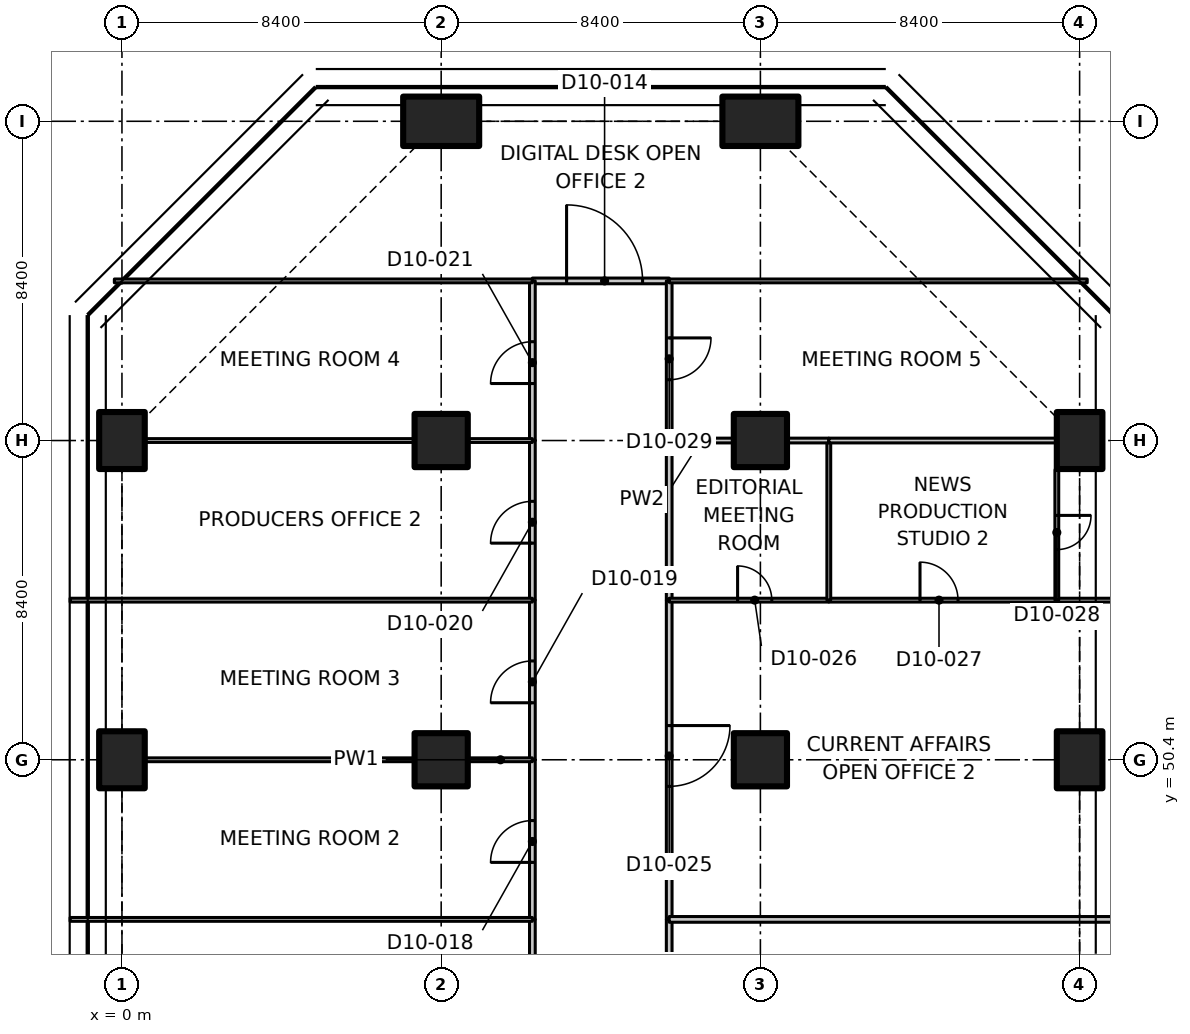
"""IFC4 building model, lengths in metres.
Left out: names, types, materials, properties, quantities, classifications, styles, units other than length and angle.
Written with IfcOpenShell. Run it as: python <this file> out.ifc"""

import sys

from ifc_helpers import new_model, si_unit, direction, frame, frame_2d, origin, origin_2d, place, context, subcontext, project, spatial, polyline, rectangle, outline, extrude, element, fill, save


model = new_model("IFC4")
c1 = context("Model", 3, precision=1e-05, world=origin(), true_north=direction((0.0, 1.0)))
c2 = subcontext(c1, "Body", "Model", "MODEL_VIEW")
j1 = project(units=[si_unit("LENGTHUNIT", "METRE"), si_unit("PLANEANGLEUNIT", "RADIAN")], contexts=[c1])
p1 = place(None, origin())
s1 = spatial("IfcSite", under=j1, at=p1, CompositionType="ELEMENT")
p2 = place(p1, origin())
s2 = spatial("IfcBuilding", under=s1, at=p2, CompositionType="ELEMENT")
p3 = place(p2, frame((0.0, 0.0, 68.9)))
s3 = spatial("IfcBuildingStorey", under=s2, at=p3, CompositionType="ELEMENT", Elevation=68.9)
for number, where, z_axis, x_axis in (
    (1, (0.0, 50.4, 0.0), (0.0, 0.0, 1.0), (1.0, 0.0, 0.0)),
    (2, (0.0, 58.8, 0.0), (0.0, 0.0, 1.0), (1.0, 0.0, 0.0)),
):
    element("IfcColumn", number, at=place(p3, frame(where, z_axis=z_axis, x_axis=x_axis)), inside=s3, PredefinedType="COLUMN", context=c2, shape_type="SweptSolid", body=[
        extrude(rectangle(XDim=1.2, YDim=1.5, at=origin_2d()), origin(), (0.0, 0.0, 1.0), 3.35),
    ])
for number, where, z_axis, x_axis in (
    (3, (8.4, 50.4, 0.0), (0.0, 0.0, 1.0), (1.0, 0.0, 0.0)),
    (4, (8.4, 58.8, 0.0), (0.0, 0.0, 1.0), (1.0, 0.0, 0.0)),
):
    element("IfcColumn", number, at=place(p3, frame(where, z_axis=z_axis, x_axis=x_axis)), inside=s3, PredefinedType="COLUMN", context=c2, shape_type="SweptSolid", body=[
        extrude(rectangle(XDim=1.4, YDim=1.4, at=origin_2d()), origin(), (0.0, 0.0, 1.0), 3.35),
    ])
p4 = place(p3, frame((8.4, 67.2, 0.0), z_axis=(0.0, 0.0, 1.0), x_axis=(0.0, 1.0, 0.0)))
e5 = element("IfcColumn", 5, at=p4, inside=s3, PredefinedType="COLUMN", context=c2, shape_type="SweptSolid", body=[
    extrude(rectangle(XDim=1.3, YDim=2.0, at=origin_2d()), origin(), (0.0, 0.0, 1.0), 3.35),
])
for number, where, z_axis, x_axis in (
    (6, (16.8, 50.4, 0.0), (0.0, 0.0, 1.0), (1.0, 0.0, 0.0)),
    (7, (16.8, 58.8, 0.0), (0.0, 0.0, 1.0), (1.0, 0.0, 0.0)),
):
    element("IfcColumn", number, at=place(p3, frame(where, z_axis=z_axis, x_axis=x_axis)), inside=s3, PredefinedType="COLUMN", context=c2, shape_type="SweptSolid", body=[
        extrude(rectangle(XDim=1.4, YDim=1.4, at=origin_2d()), origin(), (0.0, 0.0, 1.0), 3.35),
    ])
p5 = place(p3, frame((16.8, 67.2, 0.0), z_axis=(0.0, 0.0, 1.0), x_axis=(0.0, 1.0, 0.0)))
e8 = element("IfcColumn", 8, at=p5, inside=s3, PredefinedType="COLUMN", context=c2, shape_type="SweptSolid", body=[
    extrude(rectangle(XDim=1.3, YDim=2.0, at=origin_2d()), origin(), (0.0, 0.0, 1.0), 3.35),
])
for number, where, z_axis, x_axis in (
    (9, (25.2, 50.4, 0.0), (0.0, 0.0, 1.0), (1.0, 0.0, 0.0)),
    (10, (25.2, 58.8, 0.0), (0.0, 0.0, 1.0), (1.0, 0.0, 0.0)),
):
    element("IfcColumn", number, at=place(p3, frame(where, z_axis=z_axis, x_axis=x_axis)), inside=s3, PredefinedType="COLUMN", context=c2, shape_type="SweptSolid", body=[
        extrude(rectangle(XDim=1.2, YDim=1.5, at=origin_2d()), origin(), (0.0, 0.0, 1.0), 3.35),
    ])
p6 = place(p3, frame((10.8, 63.0, 0.0), z_axis=(0.0, 0.0, 1.0), x_axis=(1.0, 0.0, 0.0)))
e11 = element("IfcWall", 11, at=p6, inside=s3, PredefinedType="PARTITIONING", context=c2, shape_type="SweptSolid", body=[
    extrude(rectangle(XDim=3.6, YDim=0.15, at=frame_2d((1.8, 0.0))), origin(), (0.0, 0.0, 1.0), 3.33),
])
p7 = place(p6, frame((0.9, 0.0, 0.0)))
e12 = element("IfcOpeningElement", 12, at=p7, cuts=e11, PredefinedType="OPENING", context=c2, shape_type="SweptSolid", body=[
    extrude(rectangle(XDim=2.0, YDim=2.4, at=frame_2d((1.0, 1.2))), frame((0.0, 0.085, 0.0), z_axis=(0.0, -1.0, 0.0), x_axis=(1.0, 0.0, 0.0)), (0.0, 0.0, 1.0), 0.17),
])
p8 = place(p3, frame((10.8, 42.0, 0.0), z_axis=(0.0, 0.0, 1.0), x_axis=(0.0, 1.0, 0.0)))
e13 = element("IfcWall", 13, at=p8, inside=s3, PredefinedType="PARTITIONING", context=c2, shape_type="SweptSolid", body=[
    extrude(rectangle(XDim=4.2, YDim=0.15, at=frame_2d((2.1, 0.0))), origin(), (0.0, 0.0, 1.0), 3.33),
])
p9 = place(p8, frame((1.5, 0.0, 0.0)))
e14 = element("IfcOpeningElement", 14, at=p9, cuts=e13, PredefinedType="OPENING", context=c2, shape_type="SweptSolid", body=[
    extrude(rectangle(XDim=1.1, YDim=2.1, at=frame_2d((0.55, 1.05))), frame((0.0, 0.085, 0.0), z_axis=(0.0, -1.0, 0.0), x_axis=(1.0, 0.0, 0.0)), (0.0, 0.0, 1.0), 0.17),
])
p10 = place(p3, frame((10.8, 46.2, 0.0), z_axis=(0.0, 0.0, 1.0), x_axis=(0.0, 1.0, 0.0)))
e15 = element("IfcWall", 15, at=p10, inside=s3, PredefinedType="PARTITIONING", context=c2, shape_type="SweptSolid", body=[
    extrude(rectangle(XDim=4.2, YDim=0.15, at=frame_2d((2.1, 0.0))), origin(), (0.0, 0.0, 1.0), 3.33),
])
p11 = place(p10, frame((1.5, 0.0, 0.0)))
e16 = element("IfcOpeningElement", 16, at=p11, cuts=e15, PredefinedType="OPENING", context=c2, shape_type="SweptSolid", body=[
    extrude(rectangle(XDim=1.1, YDim=2.1, at=frame_2d((0.55, 1.05))), frame((0.0, 0.085, 0.0), z_axis=(0.0, -1.0, 0.0), x_axis=(1.0, 0.0, 0.0)), (0.0, 0.0, 1.0), 0.17),
])
p12 = place(p3, frame((10.8, 50.4, 0.0), z_axis=(0.0, 0.0, 1.0), x_axis=(0.0, 1.0, 0.0)))
e17 = element("IfcWall", 17, at=p12, inside=s3, PredefinedType="PARTITIONING", context=c2, shape_type="SweptSolid", body=[
    extrude(rectangle(XDim=4.2, YDim=0.15, at=frame_2d((2.1, 0.0))), origin(), (0.0, 0.0, 1.0), 3.33),
])
p13 = place(p12, frame((1.5, 0.0, 0.0)))
e18 = element("IfcOpeningElement", 18, at=p13, cuts=e17, PredefinedType="OPENING", context=c2, shape_type="SweptSolid", body=[
    extrude(rectangle(XDim=1.1, YDim=2.1, at=frame_2d((0.55, 1.05))), frame((0.0, 0.085, 0.0), z_axis=(0.0, -1.0, 0.0), x_axis=(1.0, 0.0, 0.0)), (0.0, 0.0, 1.0), 0.17),
])
p14 = place(p3, frame((10.8, 54.6, 0.0), z_axis=(0.0, 0.0, 1.0), x_axis=(0.0, 1.0, 0.0)))
e19 = element("IfcWall", 19, at=p14, inside=s3, PredefinedType="PARTITIONING", context=c2, shape_type="SweptSolid", body=[
    extrude(rectangle(XDim=4.2, YDim=0.15, at=frame_2d((2.1, 0.0))), origin(), (0.0, 0.0, 1.0), 3.33),
])
p15 = place(p14, frame((1.5, 0.0, 0.0)))
e20 = element("IfcOpeningElement", 20, at=p15, cuts=e19, PredefinedType="OPENING", context=c2, shape_type="SweptSolid", body=[
    extrude(rectangle(XDim=1.1, YDim=2.1, at=frame_2d((0.55, 1.05))), frame((0.0, 0.085, 0.0), z_axis=(0.0, -1.0, 0.0), x_axis=(1.0, 0.0, 0.0)), (0.0, 0.0, 1.0), 0.17),
])
p16 = place(p3, frame((10.8, 58.8, 0.0), z_axis=(0.0, 0.0, 1.0), x_axis=(0.0, 1.0, 0.0)))
e21 = element("IfcWall", 21, at=p16, inside=s3, PredefinedType="PARTITIONING", context=c2, shape_type="SweptSolid", body=[
    extrude(rectangle(XDim=4.2, YDim=0.15, at=frame_2d((2.1, 0.0))), origin(), (0.0, 0.0, 1.0), 3.33),
])
p17 = place(p16, frame((1.5, 0.0, 0.0)))
e22 = element("IfcOpeningElement", 22, at=p17, cuts=e21, PredefinedType="OPENING", context=c2, shape_type="SweptSolid", body=[
    extrude(rectangle(XDim=1.1, YDim=2.1, at=frame_2d((0.55, 1.05))), frame((0.0, 0.085, 0.0), z_axis=(0.0, -1.0, 0.0), x_axis=(1.0, 0.0, 0.0)), (0.0, 0.0, 1.0), 0.17),
])
p18 = place(p3, frame((14.4, 46.2, 0.0), z_axis=(0.0, 0.0, 1.0), x_axis=(0.0, -1.0, 0.0)))
e23 = element("IfcWall", 23, at=p18, inside=s3, PredefinedType="PARTITIONING", context=c2, shape_type="SweptSolid", body=[
    extrude(rectangle(XDim=8.4, YDim=0.15, at=frame_2d((4.2, 0.0))), origin(), (0.0, 0.0, 1.0), 3.33),
])
p19 = place(p18, frame((3.3, 0.0, 0.0)))
e24 = element("IfcOpeningElement", 24, at=p19, cuts=e23, PredefinedType="OPENING", context=c2, shape_type="SweptSolid", body=[
    extrude(rectangle(XDim=1.6, YDim=2.1, at=frame_2d((0.8, 1.05))), frame((0.0, 0.085, 0.0), z_axis=(0.0, -1.0, 0.0), x_axis=(1.0, 0.0, 0.0)), (0.0, 0.0, 1.0), 0.17),
])
p20 = place(p3, frame((14.4, 54.6, 0.0), z_axis=(0.0, 0.0, 1.0), x_axis=(0.0, -1.0, 0.0)))
e25 = element("IfcWall", 25, at=p20, inside=s3, PredefinedType="PARTITIONING", context=c2, shape_type="SweptSolid", body=[
    extrude(rectangle(XDim=8.4, YDim=0.15, at=frame_2d((4.2, 0.0))), origin(), (0.0, 0.0, 1.0), 3.33),
])
p21 = place(p20, frame((3.3, 0.0, 0.0)))
e26 = element("IfcOpeningElement", 26, at=p21, cuts=e25, PredefinedType="OPENING", context=c2, shape_type="SweptSolid", body=[
    extrude(rectangle(XDim=1.6, YDim=2.1, at=frame_2d((0.8, 1.05))), frame((0.0, 0.085, 0.0), z_axis=(0.0, -1.0, 0.0), x_axis=(1.0, 0.0, 0.0)), (0.0, 0.0, 1.0), 0.17),
])
p22 = place(p3, frame((14.4, 58.8, 0.0), z_axis=(0.0, 0.0, 1.0), x_axis=(0.0, -1.0, 0.0)))
e27 = element("IfcWall", 27, at=p22, inside=s3, PredefinedType="PARTITIONING", context=c2, shape_type="SweptSolid", body=[
    extrude(rectangle(XDim=4.2, YDim=0.15, at=frame_2d((2.1, 0.0))), origin(), (0.0, 0.0, 1.0), 3.33),
])
p23 = place(p3, frame((14.4, 63.0, 0.0), z_axis=(0.0, 0.0, 1.0), x_axis=(0.0, -1.0, 0.0)))
e28 = element("IfcWall", 28, at=p23, inside=s3, PredefinedType="PARTITIONING", context=c2, shape_type="SweptSolid", body=[
    extrude(rectangle(XDim=4.2, YDim=0.15, at=frame_2d((2.1, 0.0))), origin(), (0.0, 0.0, 1.0), 3.33),
])
p24 = place(p23, frame((1.5, 0.0, 0.0)))
e29 = element("IfcOpeningElement", 29, at=p24, cuts=e28, PredefinedType="OPENING", context=c2, shape_type="SweptSolid", body=[
    extrude(rectangle(XDim=1.1, YDim=2.1, at=frame_2d((0.55, 1.05))), frame((0.0, 0.085, 0.0), z_axis=(0.0, -1.0, 0.0), x_axis=(1.0, 0.0, 0.0)), (0.0, 0.0, 1.0), 0.17),
])
p25 = place(p3, frame((10.8, 63.0, 0.0), z_axis=(0.0, 0.0, 1.0), x_axis=(-1.0, 0.0, 0.0)))
e30 = element("IfcWall", 30, at=p25, inside=s3, PredefinedType="PARTITIONING", context=c2, shape_type="SweptSolid", body=[
    extrude(outline(polyline([(0.0, 0.0), (11.0, 0.0), (11.0, 3.33), (7.266, 3.33), (7.264, 2.98), (5.936, 2.98), (5.934, 3.33), (0.0, 3.33), (0.0, 0.0)])), frame((0.0, 0.05, 0.0), z_axis=(0.0, -1.0, 0.0), x_axis=(1.0, 0.0, 0.0)), (0.0, 0.0, 1.0), 0.1),
])
p26 = place(p3, frame((25.4, 63.0, 0.0), z_axis=(0.0, 0.0, 1.0), x_axis=(-1.0, 0.0, 0.0)))
e31 = element("IfcWall", 31, at=p26, inside=s3, PredefinedType="PARTITIONING", context=c2, shape_type="SweptSolid", body=[
    extrude(outline(polyline([(0.0, 0.0), (11.0, 0.0), (11.0, 3.33), (5.066, 3.33), (5.064, 2.98), (3.736, 2.98), (3.734, 3.33), (0.0, 3.33), (0.0, 0.0)])), frame((0.0, 0.05, 0.0), z_axis=(0.0, -1.0, 0.0), x_axis=(1.0, 0.0, 0.0)), (0.0, 0.0, 1.0), 0.1),
])
p27 = place(p3, frame((-1.365, 46.2, 0.0), z_axis=(0.0, 0.0, 1.0), x_axis=(1.0, 0.0, 0.0)))
e32 = element("IfcWall", 32, at=p27, inside=s3, PredefinedType="PARTITIONING", context=c2, shape_type="SweptSolid", body=[
    extrude(outline(polyline([(0.0, 0.0), (12.165, 0.0), (12.165, 3.33), (1.815, 3.33), (1.813, 2.98), (0.917, 2.98), (0.915, 3.33), (0.265, 3.33), (0.0, 3.33), (0.0, 0.0)])), frame((0.0, 0.05, 0.0), z_axis=(0.0, -1.0, 0.0), x_axis=(1.0, 0.0, 0.0)), (0.0, 0.0, 1.0), 0.1),
])
p28 = place(p3, frame((0.62, 50.4, 0.0), z_axis=(0.0, 0.0, 1.0), x_axis=(1.0, 0.0, 0.0)))
e33 = element("IfcWall", 33, at=p28, inside=s3, PredefinedType="PARTITIONING", context=c2, shape_type="SweptSolid", body=[
    extrude(rectangle(XDim=7.06, YDim=0.1, at=frame_2d((3.53, 0.0))), origin(), (0.0, 0.0, 1.0), 3.33),
])
p29 = place(p3, frame((9.12, 50.4, 0.0), z_axis=(0.0, 0.0, 1.0), x_axis=(1.0, 0.0, 0.0)))
e34 = element("IfcWall", 34, at=p29, inside=s3, PredefinedType="PARTITIONING", context=c2, shape_type="SweptSolid", body=[
    extrude(rectangle(XDim=1.68, YDim=0.1, at=frame_2d((0.84, 0.0))), origin(), (0.0, 0.0, 1.0), 3.33),
])
p30 = place(p3, frame((-1.365, 54.6, 0.0), z_axis=(0.0, 0.0, 1.0), x_axis=(1.0, 0.0, 0.0)))
e35 = element("IfcWall", 35, at=p30, inside=s3, PredefinedType="PARTITIONING", context=c2, shape_type="SweptSolid", body=[
    extrude(outline(polyline([(0.0, 0.0), (12.165, 0.0), (12.165, 3.33), (1.815, 3.33), (1.813, 2.98), (0.917, 2.98), (0.915, 3.33), (0.265, 3.33), (0.0, 3.33), (0.0, 0.0)])), frame((0.0, 0.05, 0.0), z_axis=(0.0, -1.0, 0.0), x_axis=(1.0, 0.0, 0.0)), (0.0, 0.0, 1.0), 0.1),
])
p31 = place(p3, frame((0.62, 58.8, 0.0), z_axis=(0.0, 0.0, 1.0), x_axis=(1.0, 0.0, 0.0)))
e36 = element("IfcWall", 36, at=p31, inside=s3, PredefinedType="PARTITIONING", context=c2, shape_type="SweptSolid", body=[
    extrude(rectangle(XDim=7.06, YDim=0.1, at=frame_2d((3.53, 0.0))), origin(), (0.0, 0.0, 1.0), 3.33),
])
p32 = place(p3, frame((9.12, 58.8, 0.0), z_axis=(0.0, 0.0, 1.0), x_axis=(1.0, 0.0, 0.0)))
e37 = element("IfcWall", 37, at=p32, inside=s3, PredefinedType="PARTITIONING", context=c2, shape_type="SweptSolid", body=[
    extrude(rectangle(XDim=1.68, YDim=0.1, at=frame_2d((0.84, 0.0))), origin(), (0.0, 0.0, 1.0), 3.33),
])
p33 = place(p3, frame((14.4, 46.2, 0.0), z_axis=(0.0, 0.0, 1.0), x_axis=(1.0, 0.0, 0.0)))
e38 = element("IfcWall", 38, at=p33, inside=s3, PredefinedType="PARTITIONING", context=c2, shape_type="SweptSolid", body=[
    extrude(outline(polyline([(0.0, 0.0), (12.165, 0.0), (12.165, 3.33), (11.9, 3.33), (11.25, 3.33), (11.248, 2.98), (10.352, 2.98), (10.35, 3.33), (0.0, 3.33), (0.0, 0.0)])), frame((0.0, 0.075, 0.0), z_axis=(0.0, -1.0, 0.0), x_axis=(1.0, 0.0, 0.0)), (0.0, 0.0, 1.0), 0.15),
])
p34 = place(p3, frame((14.4, 54.6, 0.0), z_axis=(0.0, 0.0, 1.0), x_axis=(1.0, 0.0, 0.0)))
e39 = element("IfcWall", 39, at=p34, inside=s3, PredefinedType="PARTITIONING", context=c2, shape_type="SweptSolid", body=[
    extrude(rectangle(XDim=4.2, YDim=0.1, at=frame_2d((2.1, 0.0))), origin(), (0.0, 0.0, 1.0), 3.33),
])
p35 = place(p34, frame((1.8, 0.0, 0.0)))
e40 = element("IfcOpeningElement", 40, at=p35, cuts=e39, PredefinedType="OPENING", context=c2, shape_type="SweptSolid", body=[
    extrude(rectangle(XDim=0.9, YDim=2.1, at=frame_2d((0.45, 1.05))), frame((0.0, 0.06, 0.0), z_axis=(0.0, -1.0, 0.0), x_axis=(1.0, 0.0, 0.0)), (0.0, 0.0, 1.0), 0.12),
])
p36 = place(p3, frame((18.6, 54.6, 0.0), z_axis=(0.0, 0.0, 1.0), x_axis=(1.0, 0.0, 0.0)))
e41 = element("IfcWall", 41, at=p36, inside=s3, PredefinedType="PARTITIONING", context=c2, shape_type="SweptSolid", body=[
    extrude(rectangle(XDim=6.0, YDim=0.1, at=frame_2d((3.0, 0.0))), origin(), (0.0, 0.0, 1.0), 3.33),
])
p37 = place(p36, frame((2.4, 0.0, 0.0)))
e42 = element("IfcOpeningElement", 42, at=p37, cuts=e41, PredefinedType="OPENING", context=c2, shape_type="SweptSolid", body=[
    extrude(rectangle(XDim=1.0, YDim=2.1, at=frame_2d((0.5, 1.05))), frame((0.0, 0.06, 0.0), z_axis=(0.0, -1.0, 0.0), x_axis=(1.0, 0.0, 0.0)), (0.0, 0.0, 1.0), 0.12),
])
p38 = place(p3, frame((24.6, 54.6, 0.0), z_axis=(0.0, 0.0, 1.0), x_axis=(1.0, 0.0, 0.0)))
e43 = element("IfcWall", 43, at=p38, inside=s3, PredefinedType="PARTITIONING", context=c2, shape_type="SweptSolid", body=[
    extrude(rectangle(XDim=1.965, YDim=0.1, at=frame_2d((0.982, 0.0))), origin(), (0.0, 0.0, 1.0), 2.98),
])
p39 = place(p3, frame((18.6, 58.8, 0.0), z_axis=(0.0, 0.0, 1.0), x_axis=(0.0, -1.0, 0.0)))
e44 = element("IfcWall", 44, at=p39, inside=s3, PredefinedType="PARTITIONING", context=c2, shape_type="SweptSolid", body=[
    extrude(rectangle(XDim=4.2, YDim=0.1, at=frame_2d((2.1, 0.0))), origin(), (0.0, 0.0, 1.0), 3.33),
])
p40 = place(p3, frame((14.4, 58.8, 0.0), z_axis=(0.0, 0.0, 1.0), x_axis=(1.0, 0.0, 0.0)))
e45 = element("IfcWall", 45, at=p40, inside=s3, PredefinedType="PARTITIONING", context=c2, shape_type="SweptSolid", body=[
    extrude(rectangle(XDim=1.68, YDim=0.125, at=frame_2d((0.84, 0.0))), origin(), (0.0, 0.0, 1.0), 3.33),
])
p41 = place(p3, frame((17.52, 58.8, 0.0), z_axis=(0.0, 0.0, 1.0), x_axis=(1.0, 0.0, 0.0)))
e46 = element("IfcWall", 46, at=p41, inside=s3, PredefinedType="PARTITIONING", context=c2, shape_type="SweptSolid", body=[
    extrude(rectangle(XDim=1.08, YDim=0.125, at=frame_2d((0.54, 0.0))), origin(), (0.0, 0.0, 1.0), 3.33),
])
p42 = place(p3, frame((24.6, 58.03, 0.0), z_axis=(0.0, 0.0, 1.0), x_axis=(0.0, -1.0, 0.0)))
e47 = element("IfcWall", 47, at=p42, inside=s3, PredefinedType="PARTITIONING", context=c2, shape_type="SweptSolid", body=[
    extrude(rectangle(XDim=3.43, YDim=0.1, at=frame_2d((1.715, 0.0))), origin(), (0.0, 0.0, 1.0), 3.33),
])
p43 = place(p42, frame((1.2, 0.0, 0.0)))
e48 = element("IfcOpeningElement", 48, at=p43, cuts=e47, PredefinedType="OPENING", context=c2, shape_type="SweptSolid", body=[
    extrude(rectangle(XDim=0.9, YDim=2.1, at=frame_2d((0.45, 1.05))), frame((0.0, 0.06, 0.0), z_axis=(0.0, -1.0, 0.0), x_axis=(1.0, 0.0, 0.0)), (0.0, 0.0, 1.0), 0.12),
])
p44 = place(p3, frame((18.6, 58.8, 0.0), z_axis=(0.0, 0.0, 1.0), x_axis=(1.0, 0.0, 0.0)))
e49 = element("IfcWall", 49, at=p44, inside=s3, PredefinedType="PARTITIONING", context=c2, shape_type="SweptSolid", body=[
    extrude(rectangle(XDim=5.98, YDim=0.125, at=frame_2d((2.99, 0.0))), origin(), (0.0, 0.0, 1.0), 3.33),
])
p45 = place(p7, origin())
e50 = element("IfcDoor", 50, at=p45, inside=s3, OperationType="DOUBLE_DOOR_SINGLE_SWING", PredefinedType="DOOR", context=c2, shape_type="SweptSolid", body=[
    extrude(rectangle(XDim=2.0, YDim=2.4, at=frame_2d((1.0, 1.2))), frame((0.0, 0.025, 0.0), z_axis=(0.0, -1.0, 0.0), x_axis=(1.0, 0.0, 0.0)), (0.0, 0.0, 1.0), 0.05),
])
fill(e12, e50)
p46 = place(p11, origin())
e51 = element("IfcDoor", 51, at=p46, inside=s3, OperationType="SINGLE_SWING_LEFT", PredefinedType="DOOR", context=c2, shape_type="SweptSolid", body=[
    extrude(rectangle(XDim=1.1, YDim=2.1, at=frame_2d((0.55, 1.05))), frame((0.0, 0.025, 0.0), z_axis=(0.0, -1.0, 0.0), x_axis=(1.0, 0.0, 0.0)), (0.0, 0.0, 1.0), 0.05),
])
fill(e16, e51)
p47 = place(p13, origin())
e52 = element("IfcDoor", 52, at=p47, inside=s3, OperationType="SINGLE_SWING_LEFT", PredefinedType="DOOR", context=c2, shape_type="SweptSolid", body=[
    extrude(rectangle(XDim=1.1, YDim=2.1, at=frame_2d((0.55, 1.05))), frame((0.0, 0.025, 0.0), z_axis=(0.0, -1.0, 0.0), x_axis=(1.0, 0.0, 0.0)), (0.0, 0.0, 1.0), 0.05),
])
fill(e18, e52)
p48 = place(p15, origin())
e53 = element("IfcDoor", 53, at=p48, inside=s3, OperationType="SINGLE_SWING_LEFT", PredefinedType="DOOR", context=c2, shape_type="SweptSolid", body=[
    extrude(rectangle(XDim=1.1, YDim=2.1, at=frame_2d((0.55, 1.05))), frame((0.0, 0.025, 0.0), z_axis=(0.0, -1.0, 0.0), x_axis=(1.0, 0.0, 0.0)), (0.0, 0.0, 1.0), 0.05),
])
fill(e20, e53)
p49 = place(p17, origin())
e54 = element("IfcDoor", 54, at=p49, inside=s3, OperationType="SINGLE_SWING_LEFT", PredefinedType="DOOR", context=c2, shape_type="SweptSolid", body=[
    extrude(rectangle(XDim=1.1, YDim=2.1, at=frame_2d((0.55, 1.05))), frame((0.0, 0.025, 0.0), z_axis=(0.0, -1.0, 0.0), x_axis=(1.0, 0.0, 0.0)), (0.0, 0.0, 1.0), 0.05),
])
fill(e22, e54)
p50 = place(p21, origin())
e55 = element("IfcDoor", 55, at=p50, inside=s3, OperationType="DOUBLE_DOOR_SINGLE_SWING", PredefinedType="DOOR", context=c2, shape_type="SweptSolid", body=[
    extrude(rectangle(XDim=1.6, YDim=2.1, at=frame_2d((0.8, 1.05))), frame((0.0, 0.025, 0.0), z_axis=(0.0, -1.0, 0.0), x_axis=(1.0, 0.0, 0.0)), (0.0, 0.0, 1.0), 0.05),
])
fill(e26, e55)
p51 = place(p35, origin())
e56 = element("IfcDoor", 56, at=p51, inside=s3, OperationType="SINGLE_SWING_LEFT", PredefinedType="DOOR", context=c2, shape_type="SweptSolid", body=[
    extrude(rectangle(XDim=0.9, YDim=2.1, at=frame_2d((0.45, 1.05))), frame((0.0, 0.025, 0.0), z_axis=(0.0, -1.0, 0.0), x_axis=(1.0, 0.0, 0.0)), (0.0, 0.0, 1.0), 0.05),
])
fill(e40, e56)
p52 = place(p37, origin())
e57 = element("IfcDoor", 57, at=p52, inside=s3, OperationType="SINGLE_SWING_LEFT", PredefinedType="DOOR", context=c2, shape_type="SweptSolid", body=[
    extrude(rectangle(XDim=1.0, YDim=2.1, at=frame_2d((0.5, 1.05))), frame((0.0, 0.025, 0.0), z_axis=(0.0, -1.0, 0.0), x_axis=(1.0, 0.0, 0.0)), (0.0, 0.0, 1.0), 0.05),
])
fill(e42, e57)
p53 = place(p43, origin())
e58 = element("IfcDoor", 58, at=p53, inside=s3, OperationType="SINGLE_SWING_LEFT", PredefinedType="DOOR", context=c2, shape_type="SweptSolid", body=[
    extrude(rectangle(XDim=0.9, YDim=2.1, at=frame_2d((0.45, 1.05))), frame((0.0, 0.025, 0.0), z_axis=(0.0, -1.0, 0.0), x_axis=(1.0, 0.0, 0.0)), (0.0, 0.0, 1.0), 0.05),
])
fill(e48, e58)
p54 = place(p24, origin())
e59 = element("IfcDoor", 59, at=p54, inside=s3, OperationType="SINGLE_SWING_LEFT", PredefinedType="DOOR", context=c2, shape_type="SweptSolid", body=[
    extrude(rectangle(XDim=1.1, YDim=2.1, at=frame_2d((0.55, 1.05))), frame((0.0, 0.025, 0.0), z_axis=(0.0, -1.0, 0.0), x_axis=(1.0, 0.0, 0.0)), (0.0, 0.0, 1.0), 0.05),
])
fill(e29, e59)
save(model, sys.argv[1])
